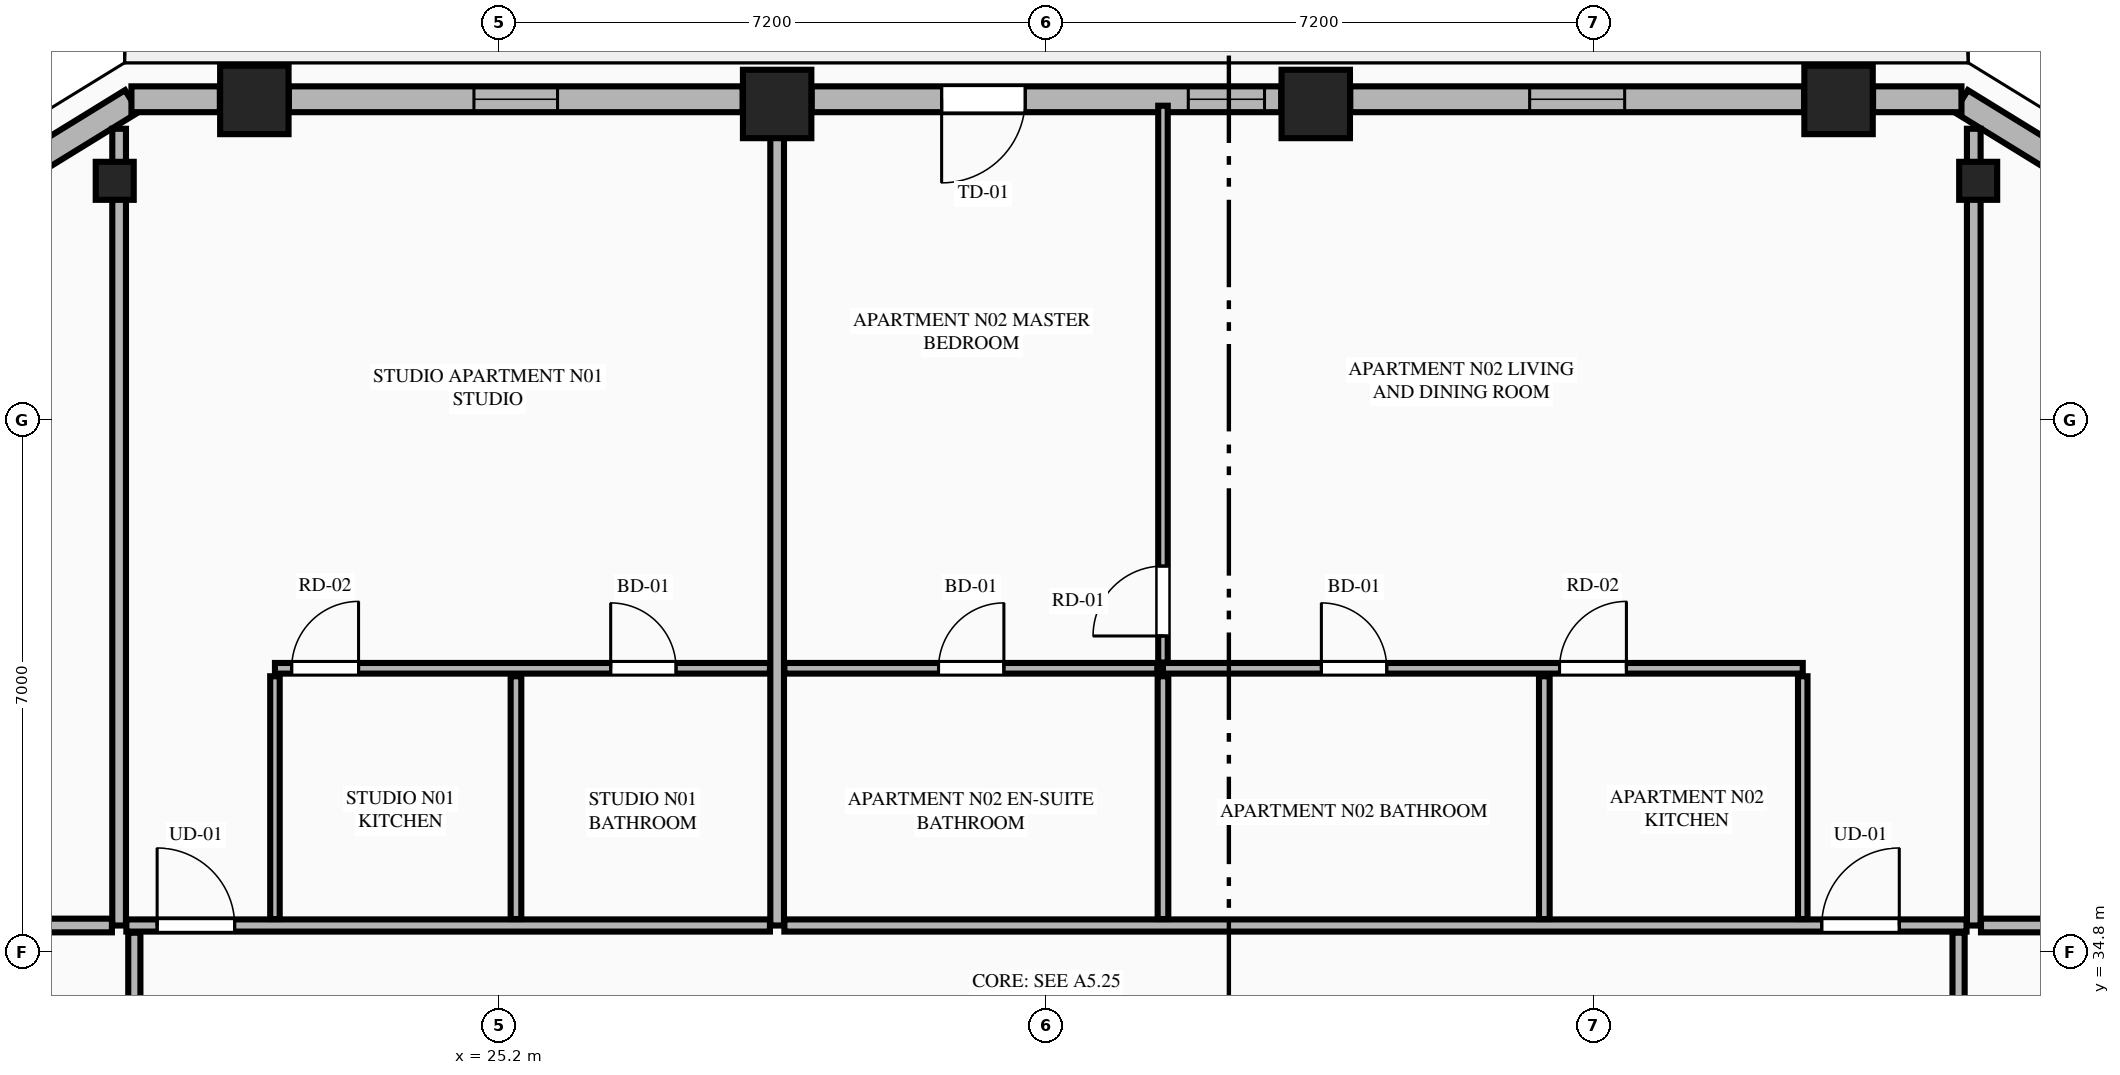
"""IFC4 building model, lengths in metres.
Left out: names, types, materials, properties, quantities, classifications, styles, units other than length and angle.
Written with IfcOpenShell. Run it as: python <this file> out.ifc"""

import sys

from ifc_helpers import new_model, si_unit, direction, frame, frame_2d, origin, origin_2d, place, context, subcontext, project, spatial, rectangle, extrude, element, fill, save


model = new_model("IFC4")
c1 = context("Model", 3, precision=1e-05, world=origin(), true_north=direction((0.0, 1.0)))
c2 = subcontext(c1, "Body", "Model", "MODEL_VIEW")
j1 = project(units=[si_unit("LENGTHUNIT", "METRE"), si_unit("PLANEANGLEUNIT", "RADIAN")], contexts=[c1])
p1 = place(None, origin())
s1 = spatial("IfcSite", under=j1, at=p1, CompositionType="ELEMENT")
p2 = place(p1, origin())
s2 = spatial("IfcBuilding", under=s1, at=p2, CompositionType="ELEMENT")
p3 = place(p2, frame((0.0, 0.0, 196.75)))
s3 = spatial("IfcBuildingStorey", under=s2, at=p3, CompositionType="ELEMENT", Elevation=196.75)
for number, where, z_axis, x_axis in (
    (1, (42.821, 46.011, 0.0), (0.0, 0.0, 1.0), (1.0, 0.0, 0.0)),
    (2, (35.943, 45.958, 0.0), (0.0, 0.0, 1.0), (1.0, 0.0, 0.0)),
    (3, (28.857, 45.958, 0.0), (0.0, 0.0, 1.0), (1.0, 0.0, 0.0)),
    (4, (21.979, 46.011, 0.0), (0.0, 0.0, 1.0), (1.0, 0.0, 0.0)),
):
    element("IfcColumn", number, at=place(p3, frame(where, z_axis=z_axis, x_axis=x_axis)), inside=s3, PredefinedType="COLUMN", context=c2, shape_type="SweptSolid", body=[
        extrude(rectangle(XDim=0.9, YDim=0.9, at=origin_2d()), origin(), (0.0, 0.0, 1.0), 3.55),
    ])
for number, where, z_axis, x_axis in (
    (5, (44.658, 44.947, 0.0), (0.0, 0.0, 1.0), (-0.865, 0.501, 0.0)),
    (6, (20.142, 44.947, 0.0), (0.0, 0.0, 1.0), (-0.865, -0.501, 0.0)),
):
    element("IfcColumn", number, at=place(p3, frame(where, z_axis=z_axis, x_axis=x_axis)), inside=s3, PredefinedType="PILASTER", context=c2, shape_type="SweptSolid", body=[
        extrude(rectangle(XDim=0.5, YDim=0.35, at=origin_2d()), origin(), (0.0, 0.0, 1.0), 3.55),
    ])
for number, where, z_axis, x_axis in (
    (7, (45.862, 45.116, 0.0), (0.0, 0.0, 1.0), (-0.852, 0.524, 0.0)),
    (8, (20.367, 45.995, 0.0), (0.0, 0.0, 1.0), (-0.852, -0.524, 0.0)),
):
    element("IfcWall", number, at=place(p3, frame(where, z_axis=z_axis, x_axis=x_axis)), inside=s3, PredefinedType="STANDARD", context=c2, shape_type="SweptSolid", body=[
        extrude(rectangle(XDim=1.678, YDim=0.34, at=frame_2d((0.839, 0.0))), origin(), (0.0, 0.0, 1.0), 3.35),
    ])
p4 = place(p3, frame((44.438, 46.02, 0.0), z_axis=(0.0, 0.0, 1.0), x_axis=(-1.0, 0.0, 0.0)))
e9 = element("IfcWall", 9, at=p4, inside=s3, PredefinedType="STANDARD", context=c2, shape_type="SweptSolid", body=[
    extrude(rectangle(XDim=1.163, YDim=0.34, at=frame_2d((0.582, 0.0))), origin(), (0.0, 0.0, 1.0), 3.35),
])
p5 = place(p3, frame((42.367, 46.02, 0.0), z_axis=(0.0, 0.0, 1.0), x_axis=(-1.0, 0.0, 0.0)))
e10 = element("IfcWall", 10, at=p5, inside=s3, PredefinedType="STANDARD", context=c2, shape_type="SweptSolid", body=[
    extrude(rectangle(XDim=5.97, YDim=0.34, at=frame_2d((2.985, 0.0))), origin(), (0.0, 0.0, 1.0), 2.883),
])
p6 = place(p5, frame((2.36, 0.0, 0.75)))
e11 = element("IfcOpeningElement", 11, at=p6, cuts=e10, PredefinedType="OPENING", context=c2, shape_type="SweptSolid", body=[
    extrude(rectangle(XDim=1.25, YDim=1.95, at=frame_2d((0.625, 0.975))), frame((0.0, 0.18, 0.0), z_axis=(0.0, -1.0, 0.0), x_axis=(1.0, 0.0, 0.0)), (0.0, 0.0, 1.0), 0.36),
])
p7 = place(p3, frame((35.489, 46.02, 0.0), z_axis=(0.0, 0.0, 1.0), x_axis=(-1.0, 0.0, 0.0)))
e12 = element("IfcWall", 12, at=p7, inside=s3, PredefinedType="STANDARD", context=c2, shape_type="SweptSolid", body=[
    extrude(rectangle(XDim=6.178, YDim=0.34, at=frame_2d((3.089, 0.0))), origin(), (0.0, 0.0, 1.0), 2.883),
])
p8 = place(p7, frame((3.368, 0.0, 0.0)))
e13 = element("IfcOpeningElement", 13, at=p8, cuts=e12, PredefinedType="OPENING", context=c2, shape_type="SweptSolid", body=[
    extrude(rectangle(XDim=1.1, YDim=2.25, at=frame_2d((0.55, 1.125))), frame((0.0, 0.18, 0.0), z_axis=(0.0, -1.0, 0.0), x_axis=(1.0, 0.0, 0.0)), (0.0, 0.0, 1.0), 0.36),
])
p9 = place(p7, frame((0.22, 0.0, 0.75)))
e14 = element("IfcOpeningElement", 14, at=p9, cuts=e12, PredefinedType="OPENING", context=c2, shape_type="SweptSolid", body=[
    extrude(rectangle(XDim=1.003, YDim=1.983, at=frame_2d((0.501, 0.991))), frame((0.0, 0.18, 0.0), z_axis=(0.0, -1.0, 0.0), x_axis=(1.0, 0.0, 0.0)), (0.0, 0.0, 1.0), 0.36),
])
p10 = place(p3, frame((28.403, 46.02, 0.0), z_axis=(0.0, 0.0, 1.0), x_axis=(-1.0, 0.0, 0.0)))
e15 = element("IfcWall", 15, at=p10, inside=s3, PredefinedType="STANDARD", context=c2, shape_type="SweptSolid", body=[
    extrude(rectangle(XDim=5.97, YDim=0.34, at=frame_2d((2.985, 0.0))), origin(), (0.0, 0.0, 1.0), 2.883),
])
p11 = place(p10, frame((2.435, 0.0, 0.75)))
e16 = element("IfcOpeningElement", 16, at=p11, cuts=e15, PredefinedType="OPENING", context=c2, shape_type="SweptSolid", body=[
    extrude(rectangle(XDim=1.1, YDim=1.983, at=frame_2d((0.55, 0.991))), frame((0.0, 0.18, 0.0), z_axis=(0.0, -1.0, 0.0), x_axis=(1.0, 0.0, 0.0)), (0.0, 0.0, 1.0), 0.36),
])
p12 = place(p3, frame((21.525, 46.02, 0.0), z_axis=(0.0, 0.0, 1.0), x_axis=(-1.0, 0.0, 0.0)))
e17 = element("IfcWall", 17, at=p12, inside=s3, PredefinedType="STANDARD", context=c2, shape_type="SweptSolid", body=[
    extrude(rectangle(XDim=1.163, YDim=0.34, at=frame_2d((0.582, 0.0))), origin(), (0.0, 0.0, 1.0), 3.35),
])
p13 = place(p3, frame((20.2, 35.15, 0.0), z_axis=(0.0, 0.0, 1.0), x_axis=(0.0, 1.0, 0.0)))
e18 = element("IfcWall", 18, at=p13, inside=s3, PredefinedType="PARTITIONING", context=c2, shape_type="SweptSolid", body=[
    extrude(rectangle(XDim=10.482, YDim=0.18, at=frame_2d((5.241, 0.0))), origin(), (0.0, 0.0, 1.0), 3.35),
])
p14 = place(p3, frame((28.857, 35.15, 0.0), z_axis=(0.0, 0.0, 1.0), x_axis=(0.0, 1.0, 0.0)))
e19 = element("IfcWall", 19, at=p14, inside=s3, PredefinedType="PARTITIONING", context=c2, shape_type="SweptSolid", body=[
    extrude(rectangle(XDim=10.695, YDim=0.18, at=frame_2d((5.348, 0.0))), origin(), (0.0, 0.0, 1.0), 2.807),
])
p15 = place(p3, frame((44.6, 35.15, 0.0), z_axis=(0.0, 0.0, 1.0), x_axis=(0.0, 1.0, 0.0)))
e20 = element("IfcWall", 20, at=p15, inside=s3, PredefinedType="PARTITIONING", context=c2, shape_type="SweptSolid", body=[
    extrude(rectangle(XDim=10.482, YDim=0.18, at=frame_2d((5.241, 0.0))), origin(), (0.0, 0.0, 1.0), 3.35),
])
p16 = place(p3, frame((20.295, 35.15, 0.0), z_axis=(0.0, 0.0, 1.0), x_axis=(1.0, 0.0, 0.0)))
e21 = element("IfcWall", 21, at=p16, inside=s3, PredefinedType="PARTITIONING", context=c2, shape_type="SweptSolid", body=[
    extrude(rectangle(XDim=8.467, YDim=0.16, at=frame_2d((4.233, 0.0))), origin(), (0.0, 0.0, 1.0), 3.35),
])
p17 = place(p16, frame((0.405, 0.0, 0.0)))
e22 = element("IfcOpeningElement", 22, at=p17, cuts=e21, PredefinedType="OPENING", context=c2, shape_type="SweptSolid", body=[
    extrude(rectangle(XDim=1.02, YDim=2.25, at=frame_2d((0.51, 1.125))), frame((0.0, 0.09, 0.0), z_axis=(0.0, -1.0, 0.0), x_axis=(1.0, 0.0, 0.0)), (0.0, 0.0, 1.0), 0.18),
])
p18 = place(p3, frame((22.25, 35.235, 0.0), z_axis=(0.0, 0.0, 1.0), x_axis=(0.0, 1.0, 0.0)))
e23 = element("IfcWall", 23, at=p18, inside=s3, PredefinedType="PARTITIONING", context=c2, shape_type="SweptSolid", body=[
    extrude(rectangle(XDim=3.194, YDim=0.125, at=frame_2d((1.597, 0.0))), origin(), (0.0, 0.0, 1.0), 2.807),
])
p19 = place(p3, frame((22.25, 38.534, 0.0), z_axis=(0.0, 0.0, 1.0), x_axis=(1.0, 0.0, 0.0)))
e24 = element("IfcWall", 24, at=p19, inside=s3, PredefinedType="PLUMBINGWALL", context=c2, shape_type="SweptSolid", body=[
    extrude(rectangle(XDim=6.512, YDim=0.14, at=frame_2d((3.256, 0.0))), origin(), (0.0, 0.0, 1.0), 3.35),
])
p20 = place(p19, frame((4.417, 0.0, 0.0)))
e25 = element("IfcOpeningElement", 25, at=p20, cuts=e24, PredefinedType="OPENING", context=c2, shape_type="SweptSolid", body=[
    extrude(rectangle(XDim=0.86, YDim=2.1, at=frame_2d((0.43, 1.05))), frame((0.0, 0.08, 0.0), z_axis=(0.0, -1.0, 0.0), x_axis=(1.0, 0.0, 0.0)), (0.0, 0.0, 1.0), 0.16),
])
p21 = place(p19, frame((0.22, 0.0, 0.0)))
e26 = element("IfcOpeningElement", 26, at=p21, cuts=e24, PredefinedType="OPENING", context=c2, shape_type="SweptSolid", body=[
    extrude(rectangle(XDim=0.88, YDim=2.15, at=frame_2d((0.44, 1.075))), frame((0.0, 0.08, 0.0), z_axis=(0.0, -1.0, 0.0), x_axis=(1.0, 0.0, 0.0)), (0.0, 0.0, 1.0), 0.16),
])
p22 = place(p3, frame((25.421, 35.235, 0.0), z_axis=(0.0, 0.0, 1.0), x_axis=(0.0, 1.0, 0.0)))
e27 = element("IfcWall", 27, at=p22, inside=s3, PredefinedType="PLUMBINGWALL", context=c2, shape_type="SweptSolid", body=[
    extrude(rectangle(XDim=3.194, YDim=0.14, at=frame_2d((1.597, 0.0))), origin(), (0.0, 0.0, 1.0), 3.35),
])
p23 = place(p3, frame((28.952, 35.15, 0.0), z_axis=(0.0, 0.0, 1.0), x_axis=(1.0, 0.0, 0.0)))
e28 = element("IfcWall", 28, at=p23, inside=s3, PredefinedType="PARTITIONING", context=c2, shape_type="SweptSolid", body=[
    extrude(rectangle(XDim=15.553, YDim=0.16, at=frame_2d((7.776, 0.0))), origin(), (0.0, 0.0, 1.0), 3.35),
])
p24 = place(p23, frame((13.648, 0.0, 0.0)))
e29 = element("IfcOpeningElement", 29, at=p24, cuts=e28, PredefinedType="OPENING", context=c2, shape_type="SweptSolid", body=[
    extrude(rectangle(XDim=1.02, YDim=2.25, at=frame_2d((0.51, 1.125))), frame((0.0, 0.09, 0.0), z_axis=(0.0, -1.0, 0.0), x_axis=(1.0, 0.0, 0.0)), (0.0, 0.0, 1.0), 0.18),
])
p25 = place(p3, frame((42.35, 35.235, 0.0), z_axis=(0.0, 0.0, 1.0), x_axis=(0.0, 1.0, 0.0)))
e30 = element("IfcWall", 30, at=p25, inside=s3, PredefinedType="PARTITIONING", context=c2, shape_type="SweptSolid", body=[
    extrude(rectangle(XDim=3.194, YDim=0.125, at=frame_2d((1.597, 0.0))), origin(), (0.0, 0.0, 1.0), 2.807),
])
p26 = place(p3, frame((33.933, 38.534, 0.0), z_axis=(0.0, 0.0, 1.0), x_axis=(1.0, 0.0, 0.0)))
e31 = element("IfcWall", 31, at=p26, inside=s3, PredefinedType="PLUMBINGWALL", context=c2, shape_type="SweptSolid", body=[
    extrude(rectangle(XDim=8.417, YDim=0.14, at=frame_2d((4.208, 0.0))), origin(), (0.0, 0.0, 1.0), 3.35),
])
p27 = place(p26, frame((2.084, 0.0, 0.0)))
e32 = element("IfcOpeningElement", 32, at=p27, cuts=e31, PredefinedType="OPENING", context=c2, shape_type="SweptSolid", body=[
    extrude(rectangle(XDim=0.86, YDim=2.1, at=frame_2d((0.43, 1.05))), frame((0.0, 0.08, 0.0), z_axis=(0.0, -1.0, 0.0), x_axis=(1.0, 0.0, 0.0)), (0.0, 0.0, 1.0), 0.16),
])
p28 = place(p26, frame((5.217, 0.0, 0.0)))
e33 = element("IfcOpeningElement", 33, at=p28, cuts=e31, PredefinedType="OPENING", context=c2, shape_type="SweptSolid", body=[
    extrude(rectangle(XDim=0.88, YDim=2.15, at=frame_2d((0.44, 1.075))), frame((0.0, 0.08, 0.0), z_axis=(0.0, -1.0, 0.0), x_axis=(1.0, 0.0, 0.0)), (0.0, 0.0, 1.0), 0.16),
])
p29 = place(p3, frame((28.952, 38.534, 0.0), z_axis=(0.0, 0.0, 1.0), x_axis=(1.0, 0.0, 0.0)))
e34 = element("IfcWall", 34, at=p29, inside=s3, PredefinedType="PLUMBINGWALL", context=c2, shape_type="SweptSolid", body=[
    extrude(rectangle(XDim=4.906, YDim=0.14, at=frame_2d((2.453, 0.0))), origin(), (0.0, 0.0, 1.0), 3.35),
])
p30 = place(p29, frame((2.028, 0.0, 0.0)))
e35 = element("IfcOpeningElement", 35, at=p30, cuts=e34, PredefinedType="OPENING", context=c2, shape_type="SweptSolid", body=[
    extrude(rectangle(XDim=0.86, YDim=2.1, at=frame_2d((0.43, 1.05))), frame((0.0, 0.08, 0.0), z_axis=(0.0, -1.0, 0.0), x_axis=(1.0, 0.0, 0.0)), (0.0, 0.0, 1.0), 0.16),
])
for number, where, z_axis, x_axis in (
    (36, (38.95, 35.235, 0.0), (0.0, 0.0, 1.0), (0.0, 1.0, 0.0)),
    (37, (33.933, 35.235, 0.0), (0.0, 0.0, 1.0), (0.0, 1.0, 0.0)),
):
    element("IfcWall", number, at=place(p3, frame(where, z_axis=z_axis, x_axis=x_axis)), inside=s3, PredefinedType="PLUMBINGWALL", context=c2, shape_type="SweptSolid", body=[
        extrude(rectangle(XDim=3.194, YDim=0.14, at=frame_2d((1.597, 0.0))), origin(), (0.0, 0.0, 1.0), 3.35),
    ])
p31 = place(p3, frame((33.933, 38.609, 0.0), z_axis=(0.0, 0.0, 1.0), x_axis=(0.0, 1.0, 0.0)))
e38 = element("IfcWall", 38, at=p31, inside=s3, PredefinedType="PARTITIONING", context=c2, shape_type="SweptSolid", body=[
    extrude(rectangle(XDim=7.326, YDim=0.125, at=frame_2d((3.663, 0.0))), origin(), (0.0, 0.0, 1.0), 3.35),
])
p32 = place(p31, frame((0.35, 0.0, 0.0)))
e39 = element("IfcOpeningElement", 39, at=p32, cuts=e38, PredefinedType="OPENING", context=c2, shape_type="SweptSolid", body=[
    extrude(rectangle(XDim=0.92, YDim=2.15, at=frame_2d((0.46, 1.075))), frame((0.0, 0.073, 0.0), z_axis=(0.0, -1.0, 0.0), x_axis=(1.0, 0.0, 0.0)), (0.0, 0.0, 1.0), 0.145),
])
for number, where, z_axis, x_axis in (
    (40, (14.11, 35.15, 0.0), (0.0, 0.0, 1.0), (1.0, 0.0, 0.0)),
    (41, (44.695, 35.15, 0.0), (0.0, 0.0, 1.0), (1.0, 0.0, 0.0)),
):
    element("IfcWall", number, at=place(p3, frame(where, z_axis=z_axis, x_axis=x_axis)), inside=s3, PredefinedType="PARTITIONING", context=c2, shape_type="SweptSolid", body=[
        extrude(rectangle(XDim=5.995, YDim=0.18, at=frame_2d((2.998, 0.0))), origin(), (0.0, 0.0, 1.0), 3.35),
    ])
p33 = place(p3, frame((20.4, 26.551, 0.0), z_axis=(0.0, 0.0, 1.0), x_axis=(0.0, 1.0, 0.0)))
e42 = element("IfcWall", 42, at=p33, inside=s3, PredefinedType="PARTITIONING", context=c2, shape_type="SweptSolid", body=[
    extrude(rectangle(XDim=8.504, YDim=0.16, at=frame_2d((4.252, 0.0))), origin(), (0.0, 0.0, 1.0), 3.35),
])
p34 = place(p33, frame((0.4, 0.0, 0.0)))
e43 = element("IfcOpeningElement", 43, at=p34, cuts=e42, PredefinedType="OPENING", context=c2, shape_type="SweptSolid", body=[
    extrude(rectangle(XDim=1.02, YDim=2.25, at=frame_2d((0.51, 1.125))), frame((0.0, 0.09, 0.0), z_axis=(0.0, -1.0, 0.0), x_axis=(1.0, 0.0, 0.0)), (0.0, 0.0, 1.0), 0.18),
])
p35 = place(p3, frame((44.4, 16.345, 0.0), z_axis=(0.0, 0.0, 1.0), x_axis=(0.0, 1.0, 0.0)))
e44 = element("IfcWall", 44, at=p35, inside=s3, PredefinedType="PARTITIONING", context=c2, shape_type="SweptSolid", body=[
    extrude(rectangle(XDim=18.71, YDim=0.16, at=frame_2d((9.355, 0.0))), origin(), (0.0, 0.0, 1.0), 3.35),
])
p36 = place(p35, frame((0.45, 0.0, 0.0)))
e45 = element("IfcOpeningElement", 45, at=p36, cuts=e44, PredefinedType="OPENING", context=c2, shape_type="SweptSolid", body=[
    extrude(rectangle(XDim=1.02, YDim=2.25, at=frame_2d((0.51, 1.125))), frame((0.0, 0.09, 0.0), z_axis=(0.0, -1.0, 0.0), x_axis=(1.0, 0.0, 0.0)), (0.0, 0.0, 1.0), 0.18),
])
p37 = place(p6, origin())
e46 = element("IfcWindow", 46, at=p37, inside=s3, PartitioningType="SINGLE_PANEL", PredefinedType="WINDOW", context=c2, shape_type="SweptSolid", body=[
    extrude(rectangle(XDim=1.25, YDim=1.95, at=frame_2d((0.625, 0.975))), frame((0.0, 0.03, 0.0), z_axis=(0.0, -1.0, 0.0), x_axis=(1.0, 0.0, 0.0)), (0.0, 0.0, 1.0), 0.06),
])
fill(e11, e46)
p38 = place(p8, origin())
e47 = element("IfcDoor", 47, at=p38, inside=s3, OperationType="SINGLE_SWING_RIGHT", PredefinedType="DOOR", context=c2, shape_type="SweptSolid", body=[
    extrude(rectangle(XDim=1.1, YDim=2.25, at=frame_2d((0.55, 1.125))), frame((0.0, 0.025, 0.0), z_axis=(0.0, -1.0, 0.0), x_axis=(1.0, 0.0, 0.0)), (0.0, 0.0, 1.0), 0.05),
])
fill(e13, e47)
p39 = place(p11, origin())
e48 = element("IfcWindow", 48, at=p39, inside=s3, PartitioningType="SINGLE_PANEL", PredefinedType="WINDOW", context=c2, shape_type="SweptSolid", body=[
    extrude(rectangle(XDim=1.1, YDim=1.983, at=frame_2d((0.55, 0.991))), frame((0.0, 0.03, 0.0), z_axis=(0.0, -1.0, 0.0), x_axis=(1.0, 0.0, 0.0)), (0.0, 0.0, 1.0), 0.06),
])
fill(e16, e48)
p40 = place(p20, origin())
e49 = element("IfcDoor", 49, at=p40, inside=s3, OperationType="SINGLE_SWING_LEFT", PredefinedType="DOOR", context=c2, shape_type="SweptSolid", body=[
    extrude(rectangle(XDim=0.86, YDim=2.1, at=frame_2d((0.43, 1.05))), frame((0.0, 0.025, 0.0), z_axis=(0.0, -1.0, 0.0), x_axis=(1.0, 0.0, 0.0)), (0.0, 0.0, 1.0), 0.05),
])
fill(e25, e49)
p41 = place(p17, origin())
e50 = element("IfcDoor", 50, at=p41, inside=s3, OperationType="SINGLE_SWING_LEFT", PredefinedType="DOOR", context=c2, shape_type="SweptSolid", body=[
    extrude(rectangle(XDim=1.02, YDim=2.25, at=frame_2d((0.51, 1.125))), frame((0.0, 0.025, 0.0), z_axis=(0.0, -1.0, 0.0), x_axis=(1.0, 0.0, 0.0)), (0.0, 0.0, 1.0), 0.05),
])
fill(e22, e50)
p42 = place(p21, origin())
e51 = element("IfcDoor", 51, at=p42, inside=s3, OperationType="SINGLE_SWING_RIGHT", PredefinedType="DOOR", context=c2, shape_type="SweptSolid", body=[
    extrude(rectangle(XDim=0.88, YDim=2.15, at=frame_2d((0.44, 1.075))), frame((0.0, 0.025, 0.0), z_axis=(0.0, -1.0, 0.0), x_axis=(1.0, 0.0, 0.0)), (0.0, 0.0, 1.0), 0.05),
])
fill(e26, e51)
p43 = place(p27, origin())
e52 = element("IfcDoor", 52, at=p43, inside=s3, OperationType="SINGLE_SWING_LEFT", PredefinedType="DOOR", context=c2, shape_type="SweptSolid", body=[
    extrude(rectangle(XDim=0.86, YDim=2.1, at=frame_2d((0.43, 1.05))), frame((0.0, 0.025, 0.0), z_axis=(0.0, -1.0, 0.0), x_axis=(1.0, 0.0, 0.0)), (0.0, 0.0, 1.0), 0.05),
])
fill(e32, e52)
p44 = place(p30, origin())
e53 = element("IfcDoor", 53, at=p44, inside=s3, OperationType="SINGLE_SWING_RIGHT", PredefinedType="DOOR", context=c2, shape_type="SweptSolid", body=[
    extrude(rectangle(XDim=0.86, YDim=2.1, at=frame_2d((0.43, 1.05))), frame((0.0, 0.025, 0.0), z_axis=(0.0, -1.0, 0.0), x_axis=(1.0, 0.0, 0.0)), (0.0, 0.0, 1.0), 0.05),
])
fill(e35, e53)
p45 = place(p24, origin())
e54 = element("IfcDoor", 54, at=p45, inside=s3, OperationType="SINGLE_SWING_RIGHT", PredefinedType="DOOR", context=c2, shape_type="SweptSolid", body=[
    extrude(rectangle(XDim=1.02, YDim=2.25, at=frame_2d((0.51, 1.125))), frame((0.0, 0.025, 0.0), z_axis=(0.0, -1.0, 0.0), x_axis=(1.0, 0.0, 0.0)), (0.0, 0.0, 1.0), 0.05),
])
fill(e29, e54)
p46 = place(p28, origin())
e55 = element("IfcDoor", 55, at=p46, inside=s3, OperationType="SINGLE_SWING_RIGHT", PredefinedType="DOOR", context=c2, shape_type="SweptSolid", body=[
    extrude(rectangle(XDim=0.88, YDim=2.15, at=frame_2d((0.44, 1.075))), frame((0.0, 0.025, 0.0), z_axis=(0.0, -1.0, 0.0), x_axis=(1.0, 0.0, 0.0)), (0.0, 0.0, 1.0), 0.05),
])
fill(e33, e55)
p47 = place(p32, origin())
e56 = element("IfcDoor", 56, at=p47, inside=s3, OperationType="SINGLE_SWING_LEFT", PredefinedType="DOOR", context=c2, shape_type="SweptSolid", body=[
    extrude(rectangle(XDim=0.92, YDim=2.15, at=frame_2d((0.46, 1.075))), frame((0.0, 0.025, 0.0), z_axis=(0.0, -1.0, 0.0), x_axis=(1.0, 0.0, 0.0)), (0.0, 0.0, 1.0), 0.05),
])
fill(e39, e56)
p48 = place(p9, origin())
e57 = element("IfcWindow", 57, at=p48, inside=s3, PartitioningType="SINGLE_PANEL", PredefinedType="WINDOW", context=c2, shape_type="SweptSolid", body=[
    extrude(rectangle(XDim=1.003, YDim=1.983, at=frame_2d((0.501, 0.991))), frame((0.0, 0.03, 0.0), z_axis=(0.0, -1.0, 0.0), x_axis=(1.0, 0.0, 0.0)), (0.0, 0.0, 1.0), 0.06),
])
fill(e14, e57)
save(model, sys.argv[1])
